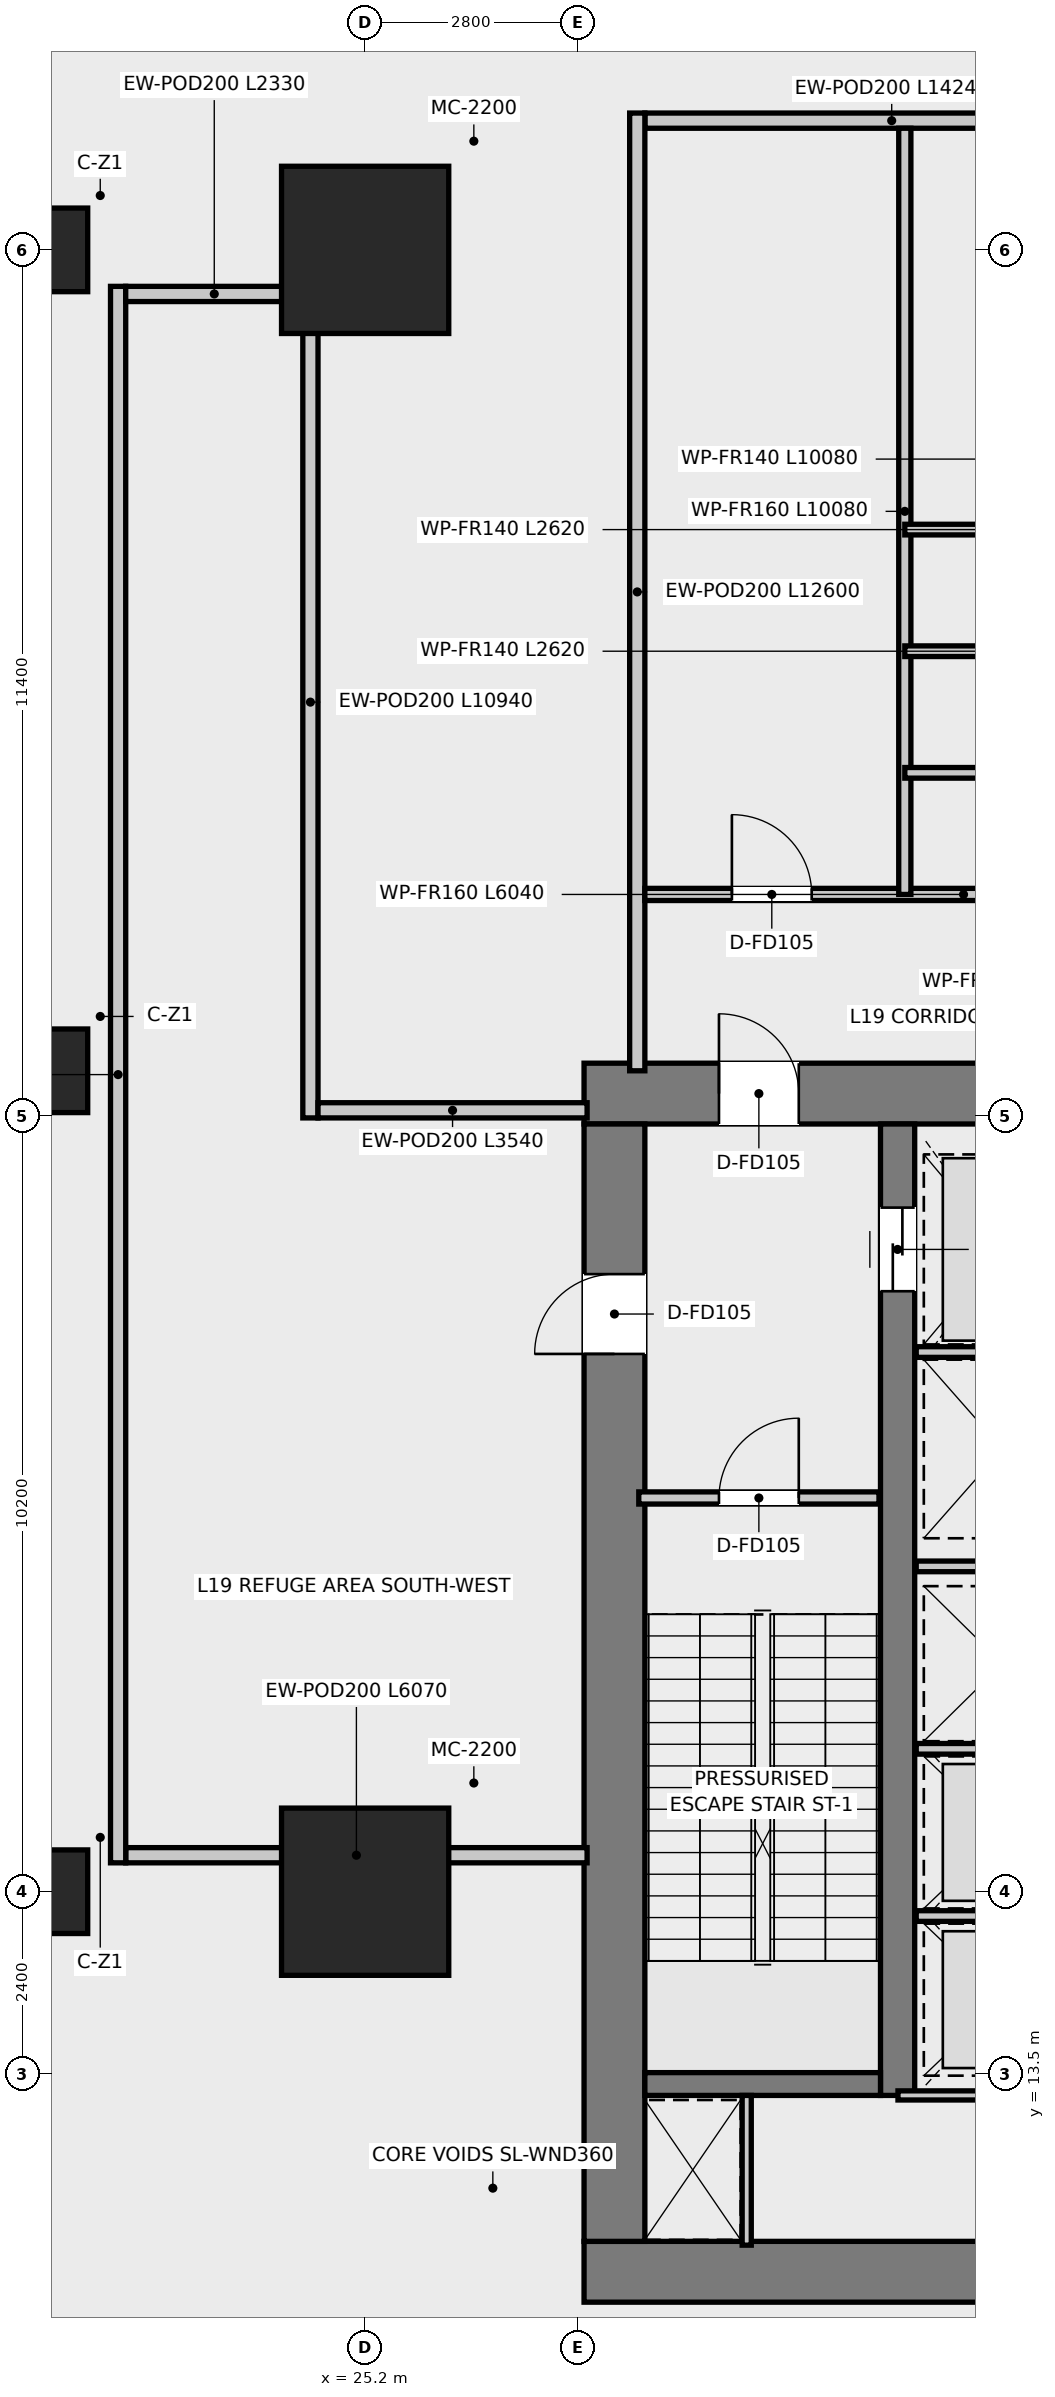
"""IFC4 building model, lengths in metres.
Left out: names, types, materials, properties, quantities, classifications, styles, units other than length and angle.
Written with IfcOpenShell. Run it as: python <this file> out.ifc"""

import sys

from ifc_helpers import new_model, si_unit, direction, frame, frame_2d, origin, origin_2d, place, context, subcontext, project, spatial, rectangle, extrude, source, transform, mapped, element, fill, save


model = new_model("IFC4")
c1 = context("Model", 3, precision=1e-05, world=origin(), true_north=direction((0.0, 1.0)))
c2 = subcontext(c1, "Body", "Model", "MODEL_VIEW")
j1 = project(units=[si_unit("LENGTHUNIT", "METRE"), si_unit("PLANEANGLEUNIT", "RADIAN")], contexts=[c1])
p1 = place(None, origin())
s1 = spatial("IfcSite", under=j1, at=p1, CompositionType="ELEMENT")
p2 = place(p1, origin())
s2 = spatial("IfcBuilding", under=s1, at=p2, CompositionType="ELEMENT")
p3 = place(p2, frame((0.0, 0.0, 80.3)))
s3 = spatial("IfcBuildingStorey", under=s2, at=p3, CompositionType="ELEMENT", Elevation=80.3)
p4 = place(p3, frame((28.08, 10.9, 0.0), z_axis=(0.0, 0.0, 1.0), x_axis=(1.0, 0.0, 0.0)))
e1 = element("IfcWall", 1, at=p4, inside=s3, PredefinedType="SHEAR", context=c2, shape_type="SweptSolid", body=[
    extrude(rectangle(XDim=15.84, YDim=0.8, at=frame_2d((7.92, 0.0))), origin(), (0.0, 0.0, 1.0), 5.8),
])
p5 = place(p3, frame((28.08, 26.4, 0.0), z_axis=(0.0, 0.0, 1.0), x_axis=(1.0, 0.0, 0.0)))
e2 = element("IfcWall", 2, at=p5, inside=s3, PredefinedType="SHEAR", context=c2, shape_type="SweptSolid", body=[
    extrude(rectangle(XDim=15.84, YDim=0.8, at=frame_2d((7.92, 0.0))), origin(), (0.0, 0.0, 1.0), 5.8),
])
p6 = place(p5, frame((7.22, 0.0, 0.0)))
e3 = element("IfcOpeningElement", 3, at=p6, cuts=e2, PredefinedType="OPENING", context=c2, shape_type="SweptSolid", body=[
    extrude(rectangle(XDim=1.4, YDim=2.2, at=frame_2d((0.7, 1.1))), frame((0.0, 0.41, 0.0), z_axis=(0.0, -1.0, 0.0), x_axis=(1.0, 0.0, 0.0)), (0.0, 0.0, 1.0), 0.82),
])
p7 = place(p5, frame((1.775, 0.0, 0.0)))
e4 = element("IfcOpeningElement", 4, at=p7, cuts=e2, PredefinedType="OPENING", context=c2, shape_type="SweptSolid", body=[
    extrude(rectangle(XDim=1.05, YDim=2.1, at=frame_2d((0.525, 1.05))), frame((0.0, 0.41, 0.0), z_axis=(0.0, -1.0, 0.0), x_axis=(1.0, 0.0, 0.0)), (0.0, 0.0, 1.0), 0.82),
])
p8 = place(p5, frame((13.015, 0.0, 0.0)))
e5 = element("IfcOpeningElement", 5, at=p8, cuts=e2, PredefinedType="OPENING", context=c2, shape_type="SweptSolid", body=[
    extrude(rectangle(XDim=1.05, YDim=2.1, at=frame_2d((0.525, 1.05))), frame((0.0, 0.41, 0.0), z_axis=(0.0, -1.0, 0.0), x_axis=(1.0, 0.0, 0.0)), (0.0, 0.0, 1.0), 0.82),
])
p9 = place(p3, frame((28.48, 11.3, 0.0), z_axis=(0.0, 0.0, 1.0), x_axis=(0.0, 1.0, 0.0)))
e6 = element("IfcWall", 6, at=p9, inside=s3, PredefinedType="SHEAR", context=c2, shape_type="SweptSolid", body=[
    extrude(rectangle(XDim=14.7, YDim=0.8, at=frame_2d((7.35, 0.0))), origin(), (0.0, 0.0, 1.0), 5.8),
])
p10 = place(p9, frame((11.675, 0.0, 0.0)))
e7 = element("IfcOpeningElement", 7, at=p10, cuts=e6, PredefinedType="OPENING", context=c2, shape_type="SweptSolid", body=[
    extrude(rectangle(XDim=1.05, YDim=2.1, at=frame_2d((0.525, 1.05))), frame((0.0, 0.41, 0.0), z_axis=(0.0, -1.0, 0.0), x_axis=(1.0, 0.0, 0.0)), (0.0, 0.0, 1.0), 0.82),
])
p11 = place(p3, frame((32.205, 13.22, 0.0), z_axis=(0.0, 0.0, 1.0), x_axis=(0.0, 1.0, 0.0)))
e8 = element("IfcWall", 8, at=p11, inside=s3, PredefinedType="SHEAR", context=c2, shape_type="SweptSolid", body=[
    extrude(rectangle(XDim=12.78, YDim=0.45, at=frame_2d((6.39, 0.0))), origin(), (0.0, 0.0, 1.0), 5.8),
])
p12 = place(p11, frame((10.58, 0.0, 0.0)))
e9 = element("IfcOpeningElement", 9, at=p12, cuts=e8, PredefinedType="OPENING", context=c2, shape_type="SweptSolid", body=[
    extrude(rectangle(XDim=1.1, YDim=2.15, at=frame_2d((0.55, 1.075))), frame((0.0, 0.235, 0.0), z_axis=(0.0, -1.0, 0.0), x_axis=(1.0, 0.0, 0.0)), (0.0, 0.0, 1.0), 0.47),
])
p13 = place(p3, frame((28.88, 13.37, 0.0), z_axis=(0.0, 0.0, 1.0), x_axis=(1.0, 0.0, 0.0)))
e10 = element("IfcWall", 10, at=p13, inside=s3, PredefinedType="SHEAR", context=c2, shape_type="SweptSolid", body=[
    extrude(rectangle(XDim=3.1, YDim=0.3, at=frame_2d((1.55, 0.0))), origin(), (0.0, 0.0, 1.0), 5.8),
])
m1 = source(origin(), c2, "Body", "SweptSolid", [
    extrude(rectangle(XDim=2.2, YDim=2.2, at=origin_2d()), origin(), (0.0, 0.0, 1.0), 5.8),
])
for number, where, z_axis, x_axis in (
    (11, (25.2, 15.9, 0.0), (0.0, 0.0, 1.0), (1.0, 0.0, 0.0)),
    (12, (25.2, 37.5, 0.0), (0.0, 0.0, 1.0), (1.0, 0.0, 0.0)),
):
    element("IfcColumn", number, at=place(p3, frame(where, z_axis=z_axis, x_axis=x_axis)), inside=s3, PredefinedType="USERDEFINED", context=c2, shape_type="MappedRepresentation", body=[
        mapped(m1, transform((0.0, 0.0, 0.0), x_axis=(1.0, 0.0, 0.0), y_axis=(0.0, 1.0, 0.0), z_axis=(0.0, 0.0, 1.0), scale=1.0)),
    ])
m2 = source(origin(), c2, "Body", "SweptSolid", [
    extrude(rectangle(XDim=1.1, YDim=1.1, at=origin_2d()), origin(), (0.0, 0.0, 1.0), 5.8),
])
for number, where, z_axis, x_axis in (
    (13, (21.0, 15.9, 0.0), (0.0, 0.0, 1.0), (1.0, 0.0, 0.0)),
    (14, (21.0, 26.7, 0.0), (0.0, 0.0, 1.0), (1.0, 0.0, 0.0)),
    (15, (21.0, 37.5, 0.0), (0.0, 0.0, 1.0), (1.0, 0.0, 0.0)),
):
    element("IfcColumn", number, at=place(p3, frame(where, z_axis=z_axis, x_axis=x_axis)), inside=s3, PredefinedType="COLUMN", context=c2, shape_type="MappedRepresentation", body=[
        mapped(m2, transform((0.0, 0.0, 0.0), x_axis=(1.0, 0.0, 0.0), y_axis=(0.0, 1.0, 0.0), z_axis=(0.0, 0.0, 1.0), scale=1.0)),
    ])
p14 = place(p3, frame((28.8, 21.08, 0.0), z_axis=(0.0, 0.0, 1.0), x_axis=(1.0, 0.0, 0.0)))
e16 = element("IfcWall", 16, at=p14, inside=s3, PredefinedType="PARTITIONING", context=c2, shape_type="SweptSolid", body=[
    extrude(rectangle(XDim=3.16, YDim=0.16, at=frame_2d((1.58, 0.0))), origin(), (0.0, 0.0, 1.0), 5.52),
])
p15 = place(p14, frame((1.055, 0.0, 0.0)))
e17 = element("IfcOpeningElement", 17, at=p15, cuts=e16, PredefinedType="OPENING", context=c2, shape_type="SweptSolid", body=[
    extrude(rectangle(XDim=1.05, YDim=2.1, at=frame_2d((0.525, 1.05))), frame((0.0, 0.09, 0.0), z_axis=(0.0, -1.0, 0.0), x_axis=(1.0, 0.0, 0.0)), (0.0, 0.0, 1.0), 0.18),
])
p16 = place(p3, frame((32.45, 23.0, 0.0), z_axis=(0.0, 0.0, 1.0), x_axis=(1.0, 0.0, 0.0)))
e18 = element("IfcWall", 18, at=p16, inside=s3, PredefinedType="PARTITIONING", context=c2, shape_type="SweptSolid", body=[
    extrude(rectangle(XDim=2.27, YDim=0.14, at=frame_2d((1.135, 0.0))), origin(), (0.0, 0.0, 1.0), 4.32),
])
for number, where, z_axis, x_axis in (
    (19, (32.45, 17.78, 0.0), (0.0, 0.0, 1.0), (1.0, 0.0, 0.0)),
    (20, (32.45, 20.18, 0.0), (0.0, 0.0, 1.0), (1.0, 0.0, 0.0)),
    (21, (32.45, 15.58, 0.0), (0.0, 0.0, 1.0), (1.0, 0.0, 0.0)),
):
    element("IfcWall", number, at=place(p3, frame(where, z_axis=z_axis, x_axis=x_axis)), inside=s3, PredefinedType="PARTITIONING", context=c2, shape_type="SweptSolid", body=[
        extrude(rectangle(XDim=2.27, YDim=0.14, at=frame_2d((1.135, 0.0))), origin(), (0.0, 0.0, 1.0), 5.52),
    ])
p17 = place(p3, frame((30.22, 11.25, 0.0), z_axis=(0.0, 0.0, 1.0), x_axis=(0.0, 1.0, 0.0)))
e22 = element("IfcWall", 22, at=p17, inside=s3, PredefinedType="PARTITIONING", context=c2, shape_type="SweptSolid", body=[
    extrude(rectangle(XDim=1.97, YDim=0.12, at=frame_2d((0.985, 0.0))), origin(), (0.0, 0.0, 1.0), 5.52),
])
p18 = place(p3, frame((32.21, 13.22, 0.0), z_axis=(0.0, 0.0, 1.0), x_axis=(1.0, 0.0, 0.0)))
e23 = element("IfcWall", 23, at=p18, inside=s3, PredefinedType="PARTITIONING", context=c2, shape_type="SweptSolid", body=[
    extrude(rectangle(XDim=7.58, YDim=0.12, at=frame_2d((3.79, 0.0))), origin(), (0.0, 0.0, 1.0), 5.52),
])
p19 = place(p18, frame((3.365, 0.0, 0.0)))
e24 = element("IfcOpeningElement", 24, at=p19, cuts=e23, PredefinedType="OPENING", context=c2, shape_type="SweptSolid", body=[
    extrude(rectangle(XDim=0.85, YDim=2.1, at=frame_2d((0.425, 1.05))), frame((0.0, 0.07, 0.0), z_axis=(0.0, -1.0, 0.0), x_axis=(1.0, 0.0, 0.0)), (0.0, 0.0, 1.0), 0.14),
])
p20 = place(p3, frame((28.88, 39.2, 0.0), z_axis=(0.0, 0.0, 1.0), x_axis=(1.0, 0.0, 0.0)))
e25 = element("IfcWall", 25, at=p20, inside=s3, PredefinedType="SOLIDWALL", context=c2, shape_type="SweptSolid", body=[
    extrude(rectangle(XDim=14.24, YDim=0.2, at=frame_2d((7.12, 0.0))), origin(), (0.0, 0.0, 1.0), 4.93),
])
p21 = place(p20, frame((6.645, 0.0, 0.0)))
e26 = element("IfcOpeningElement", 26, at=p21, cuts=e25, PredefinedType="OPENING", context=c2, shape_type="SweptSolid", body=[
    extrude(rectangle(XDim=0.95, YDim=2.1, at=frame_2d((0.475, 1.05))), frame((0.0, 0.11, 0.0), z_axis=(0.0, -1.0, 0.0), x_axis=(1.0, 0.0, 0.0)), (0.0, 0.0, 1.0), 0.22),
])
p22 = place(p3, frame((28.78, 26.7, 0.0), z_axis=(0.0, 0.0, 1.0), x_axis=(0.0, 1.0, 0.0)))
e27 = element("IfcWall", 27, at=p22, inside=s3, PredefinedType="SOLIDWALL", context=c2, shape_type="SweptSolid", body=[
    extrude(rectangle(XDim=12.6, YDim=0.2, at=frame_2d((6.3, 0.0))), origin(), (0.0, 0.0, 1.0), 4.82),
])
p23 = place(p3, frame((22.05, 16.38, 0.0), z_axis=(0.0, 0.0, 1.0), x_axis=(1.0, 0.0, 0.0)))
e28 = element("IfcWall", 28, at=p23, inside=s3, PredefinedType="SOLIDWALL", context=c2, shape_type="SweptSolid", body=[
    extrude(rectangle(XDim=6.07, YDim=0.2, at=frame_2d((3.035, 0.0))), origin(), (0.0, 0.0, 1.0), 4.82),
])
p24 = place(p3, frame((21.95, 16.28, 0.0), z_axis=(0.0, 0.0, 1.0), x_axis=(0.0, 1.0, 0.0)))
e29 = element("IfcWall", 29, at=p24, inside=s3, PredefinedType="SOLIDWALL", context=c2, shape_type="SweptSolid", body=[
    extrude(rectangle(XDim=20.74, YDim=0.2, at=frame_2d((10.37, 0.0))), origin(), (0.0, 0.0, 1.0), 4.93),
])
p25 = place(p3, frame((22.05, 36.92, 0.0), z_axis=(0.0, 0.0, 1.0), x_axis=(1.0, 0.0, 0.0)))
e30 = element("IfcWall", 30, at=p25, inside=s3, PredefinedType="SOLIDWALL", context=c2, shape_type="SweptSolid", body=[
    extrude(rectangle(XDim=2.33, YDim=0.2, at=frame_2d((1.165, 0.0))), origin(), (0.0, 0.0, 1.0), 5.52),
])
p26 = place(p3, frame((24.48, 26.08, 0.0), z_axis=(0.0, 0.0, 1.0), x_axis=(0.0, 1.0, 0.0)))
e31 = element("IfcWall", 31, at=p26, inside=s3, PredefinedType="SOLIDWALL", context=c2, shape_type="SweptSolid", body=[
    extrude(rectangle(XDim=10.94, YDim=0.2, at=frame_2d((5.47, 0.0))), origin(), (0.0, 0.0, 1.0), 4.93),
])
p27 = place(p3, frame((24.58, 26.18, 0.0), z_axis=(0.0, 0.0, 1.0), x_axis=(1.0, 0.0, 0.0)))
e32 = element("IfcWall", 32, at=p27, inside=s3, PredefinedType="SOLIDWALL", context=c2, shape_type="SweptSolid", body=[
    extrude(rectangle(XDim=3.54, YDim=0.2, at=frame_2d((1.77, 0.0))), origin(), (0.0, 0.0, 1.0), 4.82),
])
p28 = place(p3, frame((28.88, 29.02, 0.0), z_axis=(0.0, 0.0, 1.0), x_axis=(1.0, 0.0, 0.0)))
e33 = element("IfcWall", 33, at=p28, inside=s3, PredefinedType="PARTITIONING", context=c2, shape_type="SweptSolid", body=[
    extrude(rectangle(XDim=6.04, YDim=0.16, at=frame_2d((3.02, 0.0))), origin(), (0.0, 0.0, 1.0), 4.93),
])
p29 = place(p28, frame((1.145, 0.0, 0.0)))
e34 = element("IfcOpeningElement", 34, at=p29, cuts=e33, PredefinedType="OPENING", context=c2, shape_type="SweptSolid", body=[
    extrude(rectangle(XDim=1.05, YDim=2.1, at=frame_2d((0.525, 1.05))), frame((0.0, 0.09, 0.0), z_axis=(0.0, -1.0, 0.0), x_axis=(1.0, 0.0, 0.0)), (0.0, 0.0, 1.0), 0.18),
])
p30 = place(p3, frame((32.3, 29.02, 0.0), z_axis=(0.0, 0.0, 1.0), x_axis=(0.0, 1.0, 0.0)))
e35 = element("IfcWall", 35, at=p30, inside=s3, PredefinedType="PARTITIONING", context=c2, shape_type="SweptSolid", body=[
    extrude(rectangle(XDim=10.08, YDim=0.16, at=frame_2d((5.04, 0.0))), origin(), (0.0, 0.0, 1.0), 4.82),
])
p31 = place(p3, frame((32.3, 33.82, 0.0), z_axis=(0.0, 0.0, 1.0), x_axis=(1.0, 0.0, 0.0)))
e36 = element("IfcWall", 36, at=p31, inside=s3, PredefinedType="PARTITIONING", context=c2, shape_type="SweptSolid", body=[
    extrude(rectangle(XDim=2.62, YDim=0.14, at=frame_2d((1.31, 0.0))), origin(), (0.0, 0.0, 1.0), 4.97),
])
for number, where, z_axis, x_axis in (
    (37, (32.3, 30.62, 0.0), (0.0, 0.0, 1.0), (1.0, 0.0, 0.0)),
    (38, (32.3, 32.22, 0.0), (0.0, 0.0, 1.0), (1.0, 0.0, 0.0)),
):
    element("IfcWall", number, at=place(p3, frame(where, z_axis=z_axis, x_axis=x_axis)), inside=s3, PredefinedType="PARTITIONING", context=c2, shape_type="SweptSolid", body=[
        extrude(rectangle(XDim=2.62, YDim=0.14, at=frame_2d((1.31, 0.0))), origin(), (0.0, 0.0, 1.0), 5.52),
    ])
p32 = place(p15, origin())
e39 = element("IfcDoor", 39, at=p32, inside=s3, OperationType="SINGLE_SWING_RIGHT", PredefinedType="DOOR", context=c2, shape_type="SweptSolid", body=[
    extrude(rectangle(XDim=1.05, YDim=2.1, at=frame_2d((0.525, 1.05))), frame((0.0, 0.025, 0.0), z_axis=(0.0, -1.0, 0.0), x_axis=(1.0, 0.0, 0.0)), (0.0, 0.0, 1.0), 0.05),
])
fill(e17, e39)
p33 = place(p7, origin())
e40 = element("IfcDoor", 40, at=p33, inside=s3, OperationType="SINGLE_SWING_LEFT", PredefinedType="DOOR", context=c2, shape_type="SweptSolid", body=[
    extrude(rectangle(XDim=1.05, YDim=2.1, at=frame_2d((0.525, 1.05))), frame((0.0, 0.025, 0.0), z_axis=(0.0, -1.0, 0.0), x_axis=(1.0, 0.0, 0.0)), (0.0, 0.0, 1.0), 0.05),
])
fill(e4, e40)
p34 = place(p10, origin())
e41 = element("IfcDoor", 41, at=p34, inside=s3, OperationType="SINGLE_SWING_LEFT", PredefinedType="DOOR", context=c2, shape_type="SweptSolid", body=[
    extrude(rectangle(XDim=1.05, YDim=2.1, at=frame_2d((0.525, 1.05))), frame((0.0, 0.025, 0.0), z_axis=(0.0, -1.0, 0.0), x_axis=(1.0, 0.0, 0.0)), (0.0, 0.0, 1.0), 0.05),
])
fill(e7, e41)
p35 = place(p12, origin())
e42 = element("IfcDoor", 42, at=p35, inside=s3, OperationType="DOUBLE_DOOR_SLIDING", PredefinedType="DOOR", context=c2, shape_type="SweptSolid", body=[
    extrude(rectangle(XDim=1.1, YDim=2.15, at=frame_2d((0.55, 1.075))), frame((0.0, 0.025, 0.0), z_axis=(0.0, -1.0, 0.0), x_axis=(1.0, 0.0, 0.0)), (0.0, 0.0, 1.0), 0.05),
])
fill(e9, e42)
p36 = place(p29, origin())
e43 = element("IfcDoor", 43, at=p36, inside=s3, OperationType="SINGLE_SWING_LEFT", PredefinedType="DOOR", context=c2, shape_type="SweptSolid", body=[
    extrude(rectangle(XDim=1.05, YDim=2.1, at=frame_2d((0.525, 1.05))), frame((0.0, 0.025, 0.0), z_axis=(0.0, -1.0, 0.0), x_axis=(1.0, 0.0, 0.0)), (0.0, 0.0, 1.0), 0.05),
])
fill(e34, e43)
save(model, sys.argv[1])
